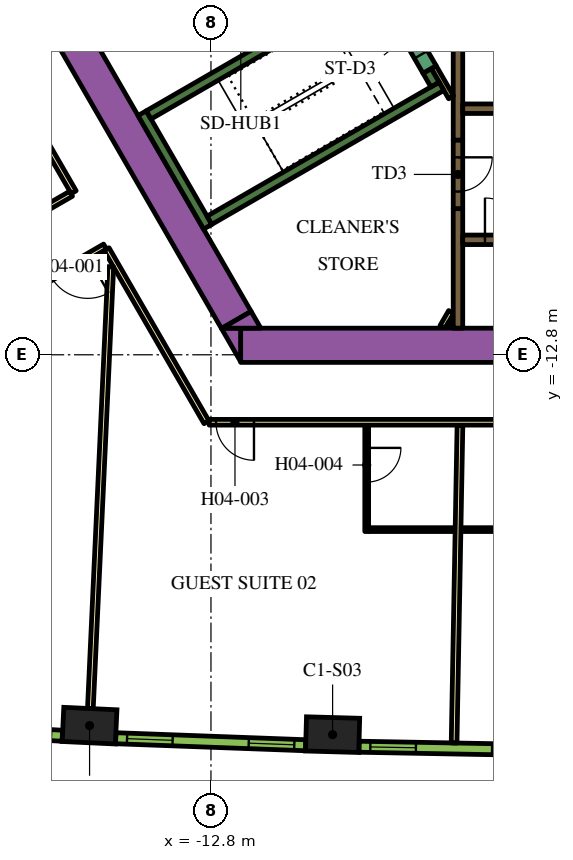
"""IFC4 building model, lengths in metres.
Left out: names, types, materials, properties, quantities, classifications, styles, units other than length and angle.
Written with IfcOpenShell. Run it as: python <this file> out.ifc"""

import sys

from ifc_helpers import new_model, si_unit, direction, frame, frame_2d, origin, origin_2d, place, context, subcontext, project, spatial, polyline, rectangle, outline, extrude, element, fill, save


model = new_model("IFC4")
c1 = context("Model", 3, precision=1e-05, world=origin(), true_north=direction((0.0, 1.0)))
c2 = subcontext(c1, "Body", "Model", "MODEL_VIEW")
j1 = project(units=[si_unit("LENGTHUNIT", "METRE"), si_unit("PLANEANGLEUNIT", "RADIAN")], contexts=[c1])
p1 = place(None, origin())
s1 = spatial("IfcSite", under=j1, at=p1, CompositionType="ELEMENT")
p2 = place(p1, origin())
s2 = spatial("IfcBuilding", under=s1, at=p2, CompositionType="ELEMENT")
p3 = place(p2, frame((0.0, 0.0, 62.7)))
s3 = spatial("IfcBuildingStorey", under=s2, at=p3, CompositionType="ELEMENT", Elevation=62.7)
for number, where, z_axis, x_axis in (
    (1, (-15.994, -22.558, 0.0), (0.0, 0.0, 1.0), (0.999, -0.046, 0.0)),
    (2, (-9.599, -22.795, 0.0), (0.0, 0.0, 1.0), (1.0, -0.028, 0.0)),
):
    element("IfcColumn", number, at=place(p3, frame(where, z_axis=z_axis, x_axis=x_axis)), inside=s3, PredefinedType="COLUMN", context=c2, shape_type="SweptSolid", body=[
        extrude(rectangle(XDim=1.4, YDim=0.9, at=origin_2d()), origin(), (0.0, 0.0, 1.0), 3.9),
    ])
p4 = place(p3, frame((-12.019, -12.55, 0.0), z_axis=(0.0, 0.0, 1.0), x_axis=(1.0, 0.0, 0.0)))
e3 = element("IfcWall", 3, at=p4, inside=s3, PredefinedType="SOLIDWALL", context=c2, shape_type="SweptSolid", body=[
    extrude(rectangle(XDim=21.63, YDim=0.9, at=frame_2d((10.815, 0.0))), origin(), (0.0, 0.0, 1.0), 3.9),
])
p5 = place(p3, origin())
e4 = element("IfcWall", 4, at=p5, inside=s3, PredefinedType="SOLIDWALL", context=c2, shape_type="SweptSolid", body=[
    extrude(outline(polyline([(-12.529, -12.1), (-12.021, -12.1), (-12.021, -12.98), (-12.529, -12.1)])), origin(), (0.0, 0.0, 1.0), 3.9),
])
p6 = place(p3, frame((-12.134, -11.883, 0.0), z_axis=(0.0, 0.0, 1.0), x_axis=(-0.500005339912, 0.866022320763, 0.0)))
e5 = element("IfcWall", 5, at=p6, inside=s3, PredefinedType="SOLIDWALL", context=c2, shape_type="SweptSolid", body=[
    extrude(rectangle(XDim=9.488, YDim=0.9, at=frame_2d((4.744, 0.0))), origin(), (0.0, 0.0, 1.0), 3.9),
])
e6 = element("IfcWall", 6, at=p5, inside=s3, PredefinedType="SOLIDWALL", context=c2, shape_type="SweptSolid", body=[
    extrude(outline(polyline([(-11.489, -12.1), (-12.505, -12.1), (-11.743, -11.66), (-11.489, -12.1)])), origin(), (0.0, 0.0, 1.0), 3.9),
])
p7 = place(p3, frame((-12.885, -9.431, 0.0), z_axis=(0.0, 0.0, 1.0), x_axis=(-0.500020560727, 0.866013532718, 0.0)))
e7 = element("IfcWall", 7, at=p7, inside=s3, PredefinedType="SOLIDWALL", context=c2, shape_type="SweptSolid", body=[
    extrude(rectangle(XDim=3.45, YDim=0.25, at=frame_2d((1.725, 0.0))), origin(), (0.0, 0.0, 1.0), 3.9),
])
p8 = place(p3, frame((-14.44, -6.49, 0.0), z_axis=(0.0, 0.0, 1.0), x_axis=(0.866022966069, 0.500004222222, 0.0)))
e8 = element("IfcWall", 8, at=p8, inside=s3, PredefinedType="SOLIDWALL", context=c2, shape_type="SweptSolid", body=[
    extrude(rectangle(XDim=6.8, YDim=0.25, at=frame_2d((3.4, 0.0))), origin(), (0.0, 0.0, 1.0), 3.9),
])
p9 = place(p3, frame((-12.84, -9.261, 0.0), z_axis=(0.0, 0.0, 1.0), x_axis=(0.866016039709, 0.500016218704, 0.0)))
e9 = element("IfcWall", 9, at=p9, inside=s3, PredefinedType="SOLIDWALL", context=c2, shape_type="SweptSolid", body=[
    extrude(rectangle(XDim=7.05, YDim=0.25, at=frame_2d((3.525, 0.0))), origin(), (0.0, 0.0, 1.0), 3.9),
])
p10 = place(p3, frame((-6.905, -5.69, 0.0), z_axis=(0.0, 0.0, 1.0), x_axis=(-0.499993700073, 0.866029041019, 0.0)))
e10 = element("IfcWall", 10, at=p10, inside=s3, PredefinedType="SOLIDWALL", context=c2, shape_type="SweptSolid", body=[
    extrude(rectangle(XDim=0.416, YDim=0.25, at=frame_2d((0.208, 0.0))), origin(), (0.0, 0.0, 1.0), 3.9),
])
p11 = place(p3, frame((-6.3, -12.1, 0.0), z_axis=(0.0, 0.0, 1.0), x_axis=(0.0, 1.0, 0.0)))
e11 = element("IfcWall", 11, at=p11, inside=s3, PredefinedType="SOLIDWALL", context=c2, shape_type="SweptSolid", body=[
    extrude(rectangle(XDim=3.146, YDim=0.25, at=frame_2d((1.573, 0.0))), origin(), (0.0, 0.0, 1.0), 3.9),
])
p12 = place(p3, frame((-6.3, -4.24, 0.0), z_axis=(0.0, 0.0, 1.0), x_axis=(0.0, -1.0, 0.0)))
e12 = element("IfcWall", 12, at=p12, inside=s3, PredefinedType="SOLIDWALL", context=c2, shape_type="SweptSolid", body=[
    extrude(rectangle(XDim=2.914, YDim=0.25, at=frame_2d((1.457, 0.0))), origin(), (0.0, 0.0, 1.0), 3.9),
])
p13 = place(p3, frame((-6.708, -12.068, 0.0), z_axis=(0.0, 0.0, 1.0), x_axis=(0.500000789788, 0.8660249478, 0.0)))
e13 = element("IfcWall", 13, at=p13, inside=s3, PredefinedType="PARTITIONING", context=c2, shape_type="SweptSolid", body=[
    extrude(rectangle(XDim=0.456, YDim=0.15, at=frame_2d((0.228, 0.0))), origin(), (0.0, 0.0, 1.0), 2.75),
])
p14 = place(p3, frame((-6.534, -12.068, 0.0), z_axis=(0.0, 0.0, 1.0), x_axis=(0.500240224089, 0.865886665912, 0.0)))
e14 = element("IfcWall", 14, at=p14, inside=s3, PredefinedType="PARTITIONING", context=c2, shape_type="SweptSolid", body=[
    extrude(rectangle(XDim=0.109, YDim=0.15, at=frame_2d((0.054, 0.0))), origin(), (0.0, 0.0, 1.0), 2.75),
])
p15 = place(p3, frame((-6.48, -6.027, 0.0), z_axis=(0.0, 0.0, 1.0), x_axis=(-0.499936960004, 0.866061796884, 0.0)))
e15 = element("IfcWall", 15, at=p15, inside=s3, PredefinedType="PARTITIONING", context=c2, shape_type="SweptSolid", body=[
    extrude(rectangle(XDim=0.919, YDim=0.15, at=frame_2d((0.46, 0.0))), origin(), (0.0, 0.0, 1.0), 3.9),
])
p16 = place(p3, frame((-6.175, -9.775, 0.0), z_axis=(0.0, 0.0, 1.0), x_axis=(1.0, 0.0, 0.0)))
e16 = element("IfcWall", 16, at=p16, inside=s3, PredefinedType="SOLIDWALL", context=c2, shape_type="SweptSolid", body=[
    extrude(rectangle(XDim=12.35, YDim=0.25, at=frame_2d((6.175, 0.0))), origin(), (0.0, 0.0, 1.0), 3.9),
])
p17 = place(p16, frame((0.585, 0.0, 0.0)))
e17 = element("IfcOpeningElement", 17, at=p17, cuts=e16, PredefinedType="OPENING", context=c2, shape_type="SweptSolid", body=[
    extrude(rectangle(XDim=1.1, YDim=2.1, at=frame_2d((0.55, 1.05))), frame((0.0, 0.135, 0.0), z_axis=(0.0, -1.0, 0.0), x_axis=(1.0, 0.0, 0.0)), (0.0, 0.0, 1.0), 0.27),
])
p18 = place(p16, frame((3.105, 0.0, 0.0)))
e18 = element("IfcOpeningElement", 18, at=p18, cuts=e16, PredefinedType="OPENING", context=c2, shape_type="SweptSolid", body=[
    extrude(rectangle(XDim=1.1, YDim=2.1, at=frame_2d((0.55, 1.05))), frame((0.0, 0.135, 0.0), z_axis=(0.0, -1.0, 0.0), x_axis=(1.0, 0.0, 0.0)), (0.0, 0.0, 1.0), 0.27),
])
p19 = place(p16, frame((5.625, 0.0, 0.0)))
e19 = element("IfcOpeningElement", 19, at=p19, cuts=e16, PredefinedType="OPENING", context=c2, shape_type="SweptSolid", body=[
    extrude(rectangle(XDim=1.1, YDim=2.1, at=frame_2d((0.55, 1.05))), frame((0.0, 0.135, 0.0), z_axis=(0.0, -1.0, 0.0), x_axis=(1.0, 0.0, 0.0)), (0.0, 0.0, 1.0), 0.27),
])
p20 = place(p16, frame((8.145, 0.0, 0.0)))
e20 = element("IfcOpeningElement", 20, at=p20, cuts=e16, PredefinedType="OPENING", context=c2, shape_type="SweptSolid", body=[
    extrude(rectangle(XDim=1.1, YDim=2.1, at=frame_2d((0.55, 1.05))), frame((0.0, 0.135, 0.0), z_axis=(0.0, -1.0, 0.0), x_axis=(1.0, 0.0, 0.0)), (0.0, 0.0, 1.0), 0.27),
])
p21 = place(p16, frame((10.665, 0.0, 0.0)))
e21 = element("IfcOpeningElement", 21, at=p21, cuts=e16, PredefinedType="OPENING", context=c2, shape_type="SweptSolid", body=[
    extrude(rectangle(XDim=1.1, YDim=2.1, at=frame_2d((0.55, 1.05))), frame((0.0, 0.135, 0.0), z_axis=(0.0, -1.0, 0.0), x_axis=(1.0, 0.0, 0.0)), (0.0, 0.0, 1.0), 0.27),
])
p22 = place(p3, frame((-6.175, -6.325, 0.0), z_axis=(0.0, 0.0, 1.0), x_axis=(1.0, 0.0, 0.0)))
e22 = element("IfcWall", 22, at=p22, inside=s3, PredefinedType="SOLIDWALL", context=c2, shape_type="SweptSolid", body=[
    extrude(rectangle(XDim=12.35, YDim=0.25, at=frame_2d((6.175, 0.0))), origin(), (0.0, 0.0, 1.0), 3.9),
])
p23 = place(p22, frame((3.205, 0.0, 0.0)))
e23 = element("IfcOpeningElement", 23, at=p23, cuts=e22, PredefinedType="OPENING", context=c2, shape_type="SweptSolid", body=[
    extrude(rectangle(XDim=0.9, YDim=2.1, at=frame_2d((0.45, 1.05))), frame((0.0, 0.135, 0.0), z_axis=(0.0, -1.0, 0.0), x_axis=(1.0, 0.0, 0.0)), (0.0, 0.0, 1.0), 0.27),
])
p24 = place(p22, frame((8.145, 0.0, 0.0)))
e24 = element("IfcOpeningElement", 24, at=p24, cuts=e22, PredefinedType="OPENING", context=c2, shape_type="SweptSolid", body=[
    extrude(rectangle(XDim=1.1, YDim=2.1, at=frame_2d((0.55, 1.05))), frame((0.0, 0.135, 0.0), z_axis=(0.0, -1.0, 0.0), x_axis=(1.0, 0.0, 0.0)), (0.0, 0.0, 1.0), 0.27),
])
p25 = place(p22, frame((10.665, 0.0, 0.0)))
e25 = element("IfcOpeningElement", 25, at=p25, cuts=e22, PredefinedType="OPENING", context=c2, shape_type="SweptSolid", body=[
    extrude(rectangle(XDim=1.1, YDim=2.1, at=frame_2d((0.55, 1.05))), frame((0.0, 0.135, 0.0), z_axis=(0.0, -1.0, 0.0), x_axis=(1.0, 0.0, 0.0)), (0.0, 0.0, 1.0), 0.27),
])
p26 = place(p3, frame((-8.098, -3.474, 0.0), z_axis=(0.0, 0.0, 1.0), x_axis=(0.49994051562, -0.866059744384, 0.0)))
e26 = element("IfcWall", 26, at=p26, inside=s3, PredefinedType="SOLIDWALL", context=c2, shape_type="SweptSolid", body=[
    extrude(rectangle(XDim=2.1, YDim=0.4, at=frame_2d((1.05, 0.0))), origin(), (0.0, 0.0, 1.0), 3.9),
])
p27 = place(p26, frame((0.45, 0.0, 0.0)))
e27 = element("IfcOpeningElement", 27, at=p27, cuts=e26, PredefinedType="OPENING", context=c2, shape_type="SweptSolid", body=[
    extrude(rectangle(XDim=1.2, YDim=2.1, at=frame_2d((0.6, 1.05))), frame((0.0, 0.21, 0.0), z_axis=(0.0, -1.0, 0.0), x_axis=(1.0, 0.0, 0.0)), (0.0, 0.0, 1.0), 0.42),
])
p28 = place(p3, frame((-6.3, -7.154, 0.0), z_axis=(0.0, 0.0, 1.0), x_axis=(0.0, -1.0, 0.0)))
e28 = element("IfcWall", 28, at=p28, inside=s3, PredefinedType="SOLIDWALL", context=c2, shape_type="SweptSolid", body=[
    extrude(rectangle(XDim=1.8, YDim=0.25, at=frame_2d((0.9, 0.0))), origin(), (0.0, 0.0, 1.0), 3.9),
])
p29 = place(p28, frame((0.45, 0.0, 0.0)))
e29 = element("IfcOpeningElement", 29, at=p29, cuts=e28, PredefinedType="OPENING", context=c2, shape_type="SweptSolid", body=[
    extrude(rectangle(XDim=0.9, YDim=2.1, at=frame_2d((0.45, 1.05))), frame((0.0, 0.135, 0.0), z_axis=(0.0, -1.0, 0.0), x_axis=(1.0, 0.0, 0.0)), (0.0, 0.0, 1.0), 0.27),
])
p30 = place(p3, frame((-16.412, -8.523, 0.0), z_axis=(0.0, 0.0, 1.0), x_axis=(-0.500001929737, 0.866024289647, 0.0)))
e30 = element("IfcWall", 30, at=p30, inside=s3, PredefinedType="PARTITIONING", context=c2, shape_type="SweptSolid", body=[
    extrude(rectangle(XDim=5.268, YDim=0.15, at=frame_2d((2.634, 0.0))), origin(), (0.0, 0.0, 1.0), 2.75),
])
p31 = place(p30, frame((4.088, 0.0, 0.0)))
e31 = element("IfcOpeningElement", 31, at=p31, cuts=e30, PredefinedType="OPENING", context=c2, shape_type="SweptSolid", body=[
    extrude(rectangle(XDim=1.0, YDim=2.1, at=frame_2d((0.5, 1.05))), frame((0.0, 0.085, 0.0), z_axis=(0.0, -1.0, 0.0), x_axis=(1.0, 0.0, 0.0)), (0.0, 0.0, 1.0), 0.17),
])
p32 = place(p3, frame((-30.463, -16.635, 0.0), z_axis=(0.0, 0.0, 1.0), x_axis=(0.866022394896, 0.500005211512, 0.0)))
e32 = element("IfcWall", 32, at=p32, inside=s3, PredefinedType="PARTITIONING", context=c2, shape_type="SweptSolid", body=[
    extrude(rectangle(XDim=16.144, YDim=0.15, at=frame_2d((8.072, 0.0))), origin(), (0.0, 0.0, 1.0), 2.75),
])
p33 = place(p32, frame((11.004, 0.0, 0.0)))
e33 = element("IfcOpeningElement", 33, at=p33, cuts=e32, PredefinedType="OPENING", context=c2, shape_type="SweptSolid", body=[
    extrude(rectangle(XDim=1.0, YDim=2.1, at=frame_2d((0.5, 1.05))), frame((0.0, 0.085, 0.0), z_axis=(0.0, -1.0, 0.0), x_axis=(1.0, 0.0, 0.0)), (0.0, 0.0, 1.0), 0.17),
])
p34 = place(p3, frame((-15.587, -9.952, 0.0), z_axis=(0.0, 0.0, 1.0), x_axis=(-0.866022197818, -0.500005552856, 0.0)))
e34 = element("IfcWall", 34, at=p34, inside=s3, PredefinedType="PARTITIONING", context=c2, shape_type="SweptSolid", body=[
    extrude(rectangle(XDim=16.224, YDim=0.15, at=frame_2d((8.112, 0.0))), origin(), (0.0, 0.0, 1.0), 2.75),
])
p35 = place(p34, frame((0.527, 0.0, 0.0)))
e35 = element("IfcOpeningElement", 35, at=p35, cuts=e34, PredefinedType="OPENING", context=c2, shape_type="SweptSolid", body=[
    extrude(rectangle(XDim=1.1, YDim=2.1, at=frame_2d((0.55, 1.05))), frame((0.0, 0.085, 0.0), z_axis=(0.0, -1.0, 0.0), x_axis=(1.0, 0.0, 0.0)), (0.0, 0.0, 1.0), 0.17),
])
p36 = place(p3, frame((-12.918, -14.575, 0.0), z_axis=(0.0, 0.0, 1.0), x_axis=(-0.500009150678, 0.866020120573, 0.0)))
e36 = element("IfcWall", 36, at=p36, inside=s3, PredefinedType="PARTITIONING", context=c2, shape_type="SweptSolid", body=[
    extrude(rectangle(XDim=5.258, YDim=0.15, at=frame_2d((2.629, 0.0))), origin(), (0.0, 0.0, 1.0), 2.75),
])
p37 = place(p3, frame((12.918, -14.575, 0.0), z_axis=(0.0, 0.0, 1.0), x_axis=(-1.0, 0.0, 0.0)))
e37 = element("IfcWall", 37, at=p37, inside=s3, PredefinedType="PARTITIONING", context=c2, shape_type="SweptSolid", body=[
    extrude(rectangle(XDim=25.766, YDim=0.15, at=frame_2d((12.883, 0.0))), origin(), (0.0, 0.0, 1.0), 2.75),
])
p38 = place(p37, frame((24.586, 0.0, 0.0)))
e38 = element("IfcOpeningElement", 38, at=p38, cuts=e37, PredefinedType="OPENING", context=c2, shape_type="SweptSolid", body=[
    extrude(rectangle(XDim=1.0, YDim=2.1, at=frame_2d((0.5, 1.05))), frame((0.0, 0.085, 0.0), z_axis=(0.0, -1.0, 0.0), x_axis=(1.0, 0.0, 0.0)), (0.0, 0.0, 1.0), 0.17),
])
p39 = place(p37, frame((9.948, 0.0, 0.0)))
e39 = element("IfcOpeningElement", 39, at=p39, cuts=e37, PredefinedType="OPENING", context=c2, shape_type="SweptSolid", body=[
    extrude(rectangle(XDim=1.0, YDim=2.1, at=frame_2d((0.5, 1.05))), frame((0.0, 0.085, 0.0), z_axis=(0.0, -1.0, 0.0), x_axis=(1.0, 0.0, 0.0)), (0.0, 0.0, 1.0), 0.17),
])
p40 = place(p37, frame((8.642, 0.0, 0.0)))
e40 = element("IfcOpeningElement", 40, at=p40, cuts=e37, PredefinedType="OPENING", context=c2, shape_type="SweptSolid", body=[
    extrude(rectangle(XDim=1.0, YDim=2.1, at=frame_2d((0.5, 1.05))), frame((0.0, 0.085, 0.0), z_axis=(0.0, -1.0, 0.0), x_axis=(1.0, 0.0, 0.0)), (0.0, 0.0, 1.0), 0.17),
])
p41 = place(p37, frame((0.18, 0.0, 0.0)))
e41 = element("IfcOpeningElement", 41, at=p41, cuts=e37, PredefinedType="OPENING", context=c2, shape_type="SweptSolid", body=[
    extrude(rectangle(XDim=1.0, YDim=2.1, at=frame_2d((0.5, 1.05))), frame((0.0, 0.085, 0.0), z_axis=(0.0, -1.0, 0.0), x_axis=(1.0, 0.0, 0.0)), (0.0, 0.0, 1.0), 0.17),
])
p42 = place(p3, frame((-15.973, -22.109, 0.0), z_axis=(0.0, 0.0, 1.0), x_axis=(0.046191717129, 0.998932592955, 0.0)))
e42 = element("IfcWall", 42, at=p42, inside=s3, PredefinedType="PARTITIONING", context=c2, shape_type="SweptSolid", body=[
    extrude(rectangle(XDim=11.638, YDim=0.15, at=frame_2d((5.819, 0.0))), origin(), (0.0, 0.0, 1.0), 2.75),
])
p43 = place(p3, frame((-6.402, -23.014, 0.0), z_axis=(0.0, 0.0, 1.0), x_axis=(0.01849587109, 0.999828936745, 0.0)))
e43 = element("IfcWall", 43, at=p43, inside=s3, PredefinedType="PARTITIONING", context=c2, shape_type="SweptSolid", body=[
    extrude(rectangle(XDim=8.355, YDim=0.15, at=frame_2d((4.178, 0.0))), origin(), (0.0, 0.0, 1.0), 2.75),
])
p44 = place(p3, frame((-8.702, -14.65, 0.0), z_axis=(0.0, 0.0, 1.0), x_axis=(0.0, -1.0, 0.0)))
e44 = element("IfcWall", 44, at=p44, inside=s3, PredefinedType="PARTITIONING", context=c2, shape_type="SweptSolid", body=[
    extrude(rectangle(XDim=2.8, YDim=0.1, at=frame_2d((1.4, 0.0))), origin(), (0.0, 0.0, 1.0), 2.75),
])
p45 = place(p44, frame((0.6, 0.0, 0.0)))
e45 = element("IfcOpeningElement", 45, at=p45, cuts=e44, PredefinedType="OPENING", context=c2, shape_type="SweptSolid", body=[
    extrude(rectangle(XDim=0.9, YDim=2.1, at=frame_2d((0.45, 1.05))), frame((0.0, 0.06, 0.0), z_axis=(0.0, -1.0, 0.0), x_axis=(1.0, 0.0, 0.0)), (0.0, 0.0, 1.0), 0.12),
])
p46 = place(p3, frame((-8.652, -17.4, 0.0), z_axis=(0.0, 0.0, 1.0), x_axis=(1.0, 0.0, 0.0)))
e46 = element("IfcWall", 46, at=p46, inside=s3, PredefinedType="PARTITIONING", context=c2, shape_type="SweptSolid", body=[
    extrude(rectangle(XDim=2.27, YDim=0.1, at=frame_2d((1.135, 0.0))), origin(), (0.0, 0.0, 1.0), 2.75),
])
p47 = place(p3, frame((-3.844, -17.4, 0.0), z_axis=(0.0, 0.0, 1.0), x_axis=(-1.0, 0.0, 0.0)))
e47 = element("IfcWall", 47, at=p47, inside=s3, PredefinedType="PARTITIONING", context=c2, shape_type="SweptSolid", body=[
    extrude(rectangle(XDim=2.37, YDim=0.1, at=frame_2d((1.185, 0.0))), origin(), (0.0, 0.0, 1.0), 2.75),
])
p48 = place(p3, frame((-21.701, -22.547, 0.0), z_axis=(0.0, 0.0, 1.0), x_axis=(0.998464708705, -0.055391564976, 0.0)))
e48 = element("IfcWall", 48, at=p48, inside=s3, PredefinedType="SOLIDWALL", context=c2, shape_type="SweptSolid", body=[
    extrude(rectangle(XDim=4.998, YDim=0.29, at=frame_2d((2.499, 0.0))), origin(), (0.0, 0.0, 1.0), 3.65),
])
p49 = place(p48, frame((0.297, 0.0, 0.9)))
e49 = element("IfcOpeningElement", 49, at=p49, cuts=e48, PredefinedType="OPENING", context=c2, shape_type="SweptSolid", body=[
    extrude(rectangle(XDim=1.2, YDim=2.15, at=frame_2d((0.6, 1.075))), frame((0.0, 0.155, 0.0), z_axis=(0.0, -1.0, 0.0), x_axis=(1.0, 0.0, 0.0)), (0.0, 0.0, 1.0), 0.31),
])
p50 = place(p48, frame((3.501, 0.0, 0.9)))
e50 = element("IfcOpeningElement", 50, at=p50, cuts=e48, PredefinedType="OPENING", context=c2, shape_type="SweptSolid", body=[
    extrude(rectangle(XDim=1.2, YDim=2.15, at=frame_2d((0.6, 1.075))), frame((0.0, 0.155, 0.0), z_axis=(0.0, -1.0, 0.0), x_axis=(1.0, 0.0, 0.0)), (0.0, 0.0, 1.0), 0.31),
])
p51 = place(p3, frame((-15.305, -22.889, 0.0), z_axis=(0.0, 0.0, 1.0), x_axis=(0.999317974969, -0.036926750529, 0.0)))
e51 = element("IfcWall", 51, at=p51, inside=s3, PredefinedType="SOLIDWALL", context=c2, shape_type="SweptSolid", body=[
    extrude(rectangle(XDim=4.998, YDim=0.29, at=frame_2d((2.499, 0.0))), origin(), (0.0, 0.0, 1.0), 3.65),
])
p52 = place(p51, frame((0.297, 0.0, 0.9)))
e52 = element("IfcOpeningElement", 52, at=p52, cuts=e51, PredefinedType="OPENING", context=c2, shape_type="SweptSolid", body=[
    extrude(rectangle(XDim=1.2, YDim=2.15, at=frame_2d((0.6, 1.075))), frame((0.0, 0.155, 0.0), z_axis=(0.0, -1.0, 0.0), x_axis=(1.0, 0.0, 0.0)), (0.0, 0.0, 1.0), 0.31),
])
p53 = place(p51, frame((3.501, 0.0, 0.9)))
e53 = element("IfcOpeningElement", 53, at=p53, cuts=e51, PredefinedType="OPENING", context=c2, shape_type="SweptSolid", body=[
    extrude(rectangle(XDim=1.2, YDim=2.15, at=frame_2d((0.6, 1.075))), frame((0.0, 0.155, 0.0), z_axis=(0.0, -1.0, 0.0), x_axis=(1.0, 0.0, 0.0)), (0.0, 0.0, 1.0), 0.31),
])
p54 = place(p3, frame((-8.904, -23.113, 0.0), z_axis=(0.0, 0.0, 1.0), x_axis=(0.999829529479, -0.018463801951, 0.0)))
e54 = element("IfcWall", 54, at=p54, inside=s3, PredefinedType="SOLIDWALL", context=c2, shape_type="SweptSolid", body=[
    extrude(rectangle(XDim=4.998, YDim=0.29, at=frame_2d((2.499, 0.0))), origin(), (0.0, 0.0, 1.0), 3.65),
])
p55 = place(p54, frame((0.297, 0.0, 0.9)))
e55 = element("IfcOpeningElement", 55, at=p55, cuts=e54, PredefinedType="OPENING", context=c2, shape_type="SweptSolid", body=[
    extrude(rectangle(XDim=1.2, YDim=2.15, at=frame_2d((0.6, 1.075))), frame((0.0, 0.155, 0.0), z_axis=(0.0, -1.0, 0.0), x_axis=(1.0, 0.0, 0.0)), (0.0, 0.0, 1.0), 0.31),
])
p56 = place(p54, frame((3.501, 0.0, 0.9)))
e56 = element("IfcOpeningElement", 56, at=p56, cuts=e54, PredefinedType="OPENING", context=c2, shape_type="SweptSolid", body=[
    extrude(rectangle(XDim=1.2, YDim=2.15, at=frame_2d((0.6, 1.075))), frame((0.0, 0.155, 0.0), z_axis=(0.0, -1.0, 0.0), x_axis=(1.0, 0.0, 0.0)), (0.0, 0.0, 1.0), 0.31),
])
p57 = place(p17, origin())
e57 = element("IfcDoor", 57, at=p57, inside=s3, OperationType="DOUBLE_DOOR_SLIDING", PredefinedType="DOOR", context=c2, shape_type="SweptSolid", body=[
    extrude(rectangle(XDim=1.1, YDim=2.1, at=frame_2d((0.55, 1.05))), frame((0.0, 0.025, 0.0), z_axis=(0.0, -1.0, 0.0), x_axis=(1.0, 0.0, 0.0)), (0.0, 0.0, 1.0), 0.05),
])
fill(e17, e57)
p58 = place(p27, origin())
e58 = element("IfcDoor", 58, at=p58, inside=s3, OperationType="SINGLE_SWING_LEFT", PredefinedType="DOOR", context=c2, shape_type="SweptSolid", body=[
    extrude(rectangle(XDim=1.2, YDim=2.1, at=frame_2d((0.6, 1.05))), frame((0.0, 0.025, 0.0), z_axis=(0.0, -1.0, 0.0), x_axis=(1.0, 0.0, 0.0)), (0.0, 0.0, 1.0), 0.05),
])
fill(e27, e58)
p59 = place(p29, origin())
e59 = element("IfcDoor", 59, at=p59, inside=s3, OperationType="SINGLE_SWING_LEFT", PredefinedType="DOOR", context=c2, shape_type="SweptSolid", body=[
    extrude(rectangle(XDim=0.9, YDim=2.1, at=frame_2d((0.45, 1.05))), frame((0.0, 0.025, 0.0), z_axis=(0.0, -1.0, 0.0), x_axis=(1.0, 0.0, 0.0)), (0.0, 0.0, 1.0), 0.05),
])
fill(e29, e59)
p60 = place(p35, origin())
e60 = element("IfcDoor", 60, at=p60, inside=s3, OperationType="SINGLE_SWING_LEFT", PredefinedType="DOOR", context=c2, shape_type="SweptSolid", body=[
    extrude(rectangle(XDim=1.1, YDim=2.1, at=frame_2d((0.55, 1.05))), frame((0.0, 0.025, 0.0), z_axis=(0.0, -1.0, 0.0), x_axis=(1.0, 0.0, 0.0)), (0.0, 0.0, 1.0), 0.05),
])
fill(e35, e60)
p61 = place(p38, origin())
e61 = element("IfcDoor", 61, at=p61, inside=s3, OperationType="SINGLE_SWING_RIGHT", PredefinedType="DOOR", context=c2, shape_type="SweptSolid", body=[
    extrude(rectangle(XDim=1.0, YDim=2.1, at=frame_2d((0.5, 1.05))), frame((0.0, 0.025, 0.0), z_axis=(0.0, -1.0, 0.0), x_axis=(1.0, 0.0, 0.0)), (0.0, 0.0, 1.0), 0.05),
])
fill(e38, e61)
p62 = place(p45, origin())
e62 = element("IfcDoor", 62, at=p62, inside=s3, OperationType="SINGLE_SWING_LEFT", PredefinedType="DOOR", context=c2, shape_type="SweptSolid", body=[
    extrude(rectangle(XDim=0.9, YDim=2.1, at=frame_2d((0.45, 1.05))), frame((0.0, 0.025, 0.0), z_axis=(0.0, -1.0, 0.0), x_axis=(1.0, 0.0, 0.0)), (0.0, 0.0, 1.0), 0.05),
])
fill(e45, e62)
p63 = place(p52, origin())
e63 = element("IfcWindow", 63, at=p63, inside=s3, PartitioningType="DOUBLE_PANEL_VERTICAL", PredefinedType="WINDOW", context=c2, shape_type="SweptSolid", body=[
    extrude(rectangle(XDim=1.2, YDim=2.15, at=frame_2d((0.6, 1.075))), frame((0.0, 0.015, 0.0), z_axis=(0.0, -1.0, 0.0), x_axis=(1.0, 0.0, 0.0)), (0.0, 0.0, 1.0), 0.06),
])
fill(e52, e63)
p64 = place(p53, origin())
e64 = element("IfcWindow", 64, at=p64, inside=s3, PartitioningType="DOUBLE_PANEL_VERTICAL", PredefinedType="WINDOW", context=c2, shape_type="SweptSolid", body=[
    extrude(rectangle(XDim=1.2, YDim=2.15, at=frame_2d((0.6, 1.075))), frame((0.0, 0.015, 0.0), z_axis=(0.0, -1.0, 0.0), x_axis=(1.0, 0.0, 0.0)), (0.0, 0.0, 1.0), 0.06),
])
fill(e53, e64)
p65 = place(p55, origin())
e65 = element("IfcWindow", 65, at=p65, inside=s3, PartitioningType="DOUBLE_PANEL_VERTICAL", PredefinedType="WINDOW", context=c2, shape_type="SweptSolid", body=[
    extrude(rectangle(XDim=1.2, YDim=2.15, at=frame_2d((0.6, 1.075))), frame((0.0, 0.015, 0.0), z_axis=(0.0, -1.0, 0.0), x_axis=(1.0, 0.0, 0.0)), (0.0, 0.0, 1.0), 0.06),
])
fill(e55, e65)
p66 = place(p56, origin())
e66 = element("IfcWindow", 66, at=p66, inside=s3, PartitioningType="DOUBLE_PANEL_VERTICAL", PredefinedType="WINDOW", context=c2, shape_type="SweptSolid", body=[
    extrude(rectangle(XDim=1.2, YDim=2.15, at=frame_2d((0.6, 1.075))), frame((0.0, 0.015, 0.0), z_axis=(0.0, -1.0, 0.0), x_axis=(1.0, 0.0, 0.0)), (0.0, 0.0, 1.0), 0.06),
])
fill(e56, e66)
save(model, sys.argv[1])
